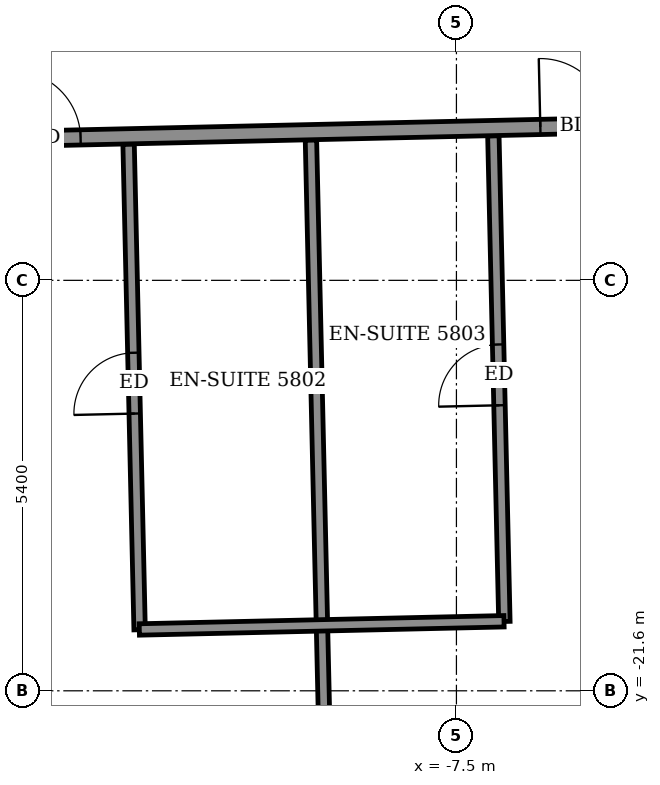
"""IFC4 building model, lengths in metres.
Left out: names, types, materials, properties, quantities, classifications, styles, units other than length and angle.
Written with IfcOpenShell. Run it as: python <this file> out.ifc"""

import sys

from ifc_helpers import new_model, si_unit, direction, frame, frame_2d, origin, place, context, subcontext, project, spatial, rectangle, extrude, element, fill, save


model = new_model("IFC4")
c1 = context("Model", 3, precision=1e-05, world=origin(), true_north=direction((0.0, 1.0)))
c2 = subcontext(c1, "Body", "Model", "MODEL_VIEW")
j1 = project(units=[si_unit("LENGTHUNIT", "METRE"), si_unit("PLANEANGLEUNIT", "RADIAN")], contexts=[c1])
p1 = place(None, origin())
s1 = spatial("IfcSite", under=j1, at=p1, CompositionType="ELEMENT")
p2 = place(p1, origin())
s2 = spatial("IfcBuilding", under=s1, at=p2, CompositionType="ELEMENT")
p3 = place(p2, frame((0.0, 0.0, 231.1)))
s3 = spatial("IfcBuildingStorey", under=s2, at=p3, CompositionType="ELEMENT", Elevation=231.1)
p4 = place(p3, frame((-9.156, -25.728, 0.0), z_axis=(0.0, 0.0, 1.0), x_axis=(-0.022684355347, 0.999742676904, 0.0)))
e1 = element("IfcWall", 1, at=p4, inside=s3, PredefinedType="PARTITIONING", context=c2, shape_type="SweptSolid", body=[
    extrude(rectangle(XDim=11.376, YDim=0.15, at=frame_2d((5.688, 0.0))), origin(), (0.0, 0.0, 1.0), 3.05),
])
p5 = place(p3, frame((-11.668, -20.797, 0.0), z_axis=(0.0, 0.0, 1.0), x_axis=(-0.022695368097, 0.999742426962, 0.0)))
e2 = element("IfcWall", 2, at=p5, inside=s3, PredefinedType="PARTITIONING", context=c2, shape_type="SweptSolid", body=[
    extrude(rectangle(XDim=6.39, YDim=0.15, at=frame_2d((3.195, 0.0))), origin(), (0.0, 0.0, 1.0), 3.05),
])
p6 = place(p5, frame((2.845, 0.0, 0.0)))
e3 = element("IfcOpeningElement", 3, at=p6, cuts=e2, PredefinedType="OPENING", context=c2, shape_type="SweptSolid", body=[
    extrude(rectangle(XDim=0.8, YDim=2.1, at=frame_2d((0.4, 1.05))), frame((0.0, 0.085, 0.0), z_axis=(0.0, -1.0, 0.0), x_axis=(1.0, 0.0, 0.0)), (0.0, 0.0, 1.0), 0.17),
])
p7 = place(p3, frame((-6.869, -20.688, 0.0), z_axis=(0.0, 0.0, 1.0), x_axis=(-0.022696235044, 0.99974240728, 0.0)))
e4 = element("IfcWall", 4, at=p7, inside=s3, PredefinedType="PARTITIONING", context=c2, shape_type="SweptSolid", body=[
    extrude(rectangle(XDim=6.39, YDim=0.15, at=frame_2d((3.195, 0.0))), origin(), (0.0, 0.0, 1.0), 3.05),
])
p8 = place(p7, frame((2.845, 0.0, 0.0)))
e5 = element("IfcOpeningElement", 5, at=p8, cuts=e4, PredefinedType="OPENING", context=c2, shape_type="SweptSolid", body=[
    extrude(rectangle(XDim=0.8, YDim=2.1, at=frame_2d((0.4, 1.05))), frame((0.0, 0.085, 0.0), z_axis=(0.0, -1.0, 0.0), x_axis=(1.0, 0.0, 0.0)), (0.0, 0.0, 1.0), 0.17),
])
p9 = place(p3, frame((-11.672, -20.793, 0.0), z_axis=(0.0, 0.0, 1.0), x_axis=(0.999747191239, 0.022484519337, 0.0)))
e6 = element("IfcWall", 6, at=p9, inside=s3, PredefinedType="PARTITIONING", context=c2, shape_type="SweptSolid", body=[
    extrude(rectangle(XDim=4.799, YDim=0.15, at=frame_2d((2.4, 0.0))), origin(), (0.0, 0.0, 1.0), 3.05),
])
p10 = place(p3, frame((-27.016, -14.65, 0.0), z_axis=(0.0, 0.0, 1.0), x_axis=(0.999742623033, 0.022686729391, 0.0)))
e7 = element("IfcWall", 7, at=p10, inside=s3, PredefinedType="PARTITIONING", context=c2, shape_type="SweptSolid", body=[
    extrude(rectangle(XDim=50.858, YDim=0.2, at=frame_2d((25.429, 0.0))), origin(), (0.0, 0.0, 1.0), 3.05),
])
p11 = place(p10, frame((1.625, 0.0, 0.0)))
e8 = element("IfcOpeningElement", 8, at=p11, cuts=e7, PredefinedType="OPENING", context=c2, shape_type="SweptSolid", body=[
    extrude(rectangle(XDim=1.0, YDim=2.1, at=frame_2d((0.5, 1.05))), frame((0.0, 0.11, 0.0), z_axis=(0.0, -1.0, 0.0), x_axis=(1.0, 0.0, 0.0)), (0.0, 0.0, 1.0), 0.22),
])
p12 = place(p10, frame((6.6, 0.0, 0.0)))
e9 = element("IfcOpeningElement", 9, at=p12, cuts=e7, PredefinedType="OPENING", context=c2, shape_type="SweptSolid", body=[
    extrude(rectangle(XDim=0.9, YDim=2.1, at=frame_2d((0.45, 1.05))), frame((0.0, 0.11, 0.0), z_axis=(0.0, -1.0, 0.0), x_axis=(1.0, 0.0, 0.0)), (0.0, 0.0, 1.0), 0.22),
])
p13 = place(p10, frame((11.5, 0.0, 0.0)))
e10 = element("IfcOpeningElement", 10, at=p13, cuts=e7, PredefinedType="OPENING", context=c2, shape_type="SweptSolid", body=[
    extrude(rectangle(XDim=0.9, YDim=2.1, at=frame_2d((0.45, 1.05))), frame((0.0, 0.11, 0.0), z_axis=(0.0, -1.0, 0.0), x_axis=(1.0, 0.0, 0.0)), (0.0, 0.0, 1.0), 0.22),
])
p14 = place(p10, frame((13.675, 0.0, 0.0)))
e11 = element("IfcOpeningElement", 11, at=p14, cuts=e7, PredefinedType="OPENING", context=c2, shape_type="SweptSolid", body=[
    extrude(rectangle(XDim=0.9, YDim=2.1, at=frame_2d((0.45, 1.05))), frame((0.0, 0.11, 0.0), z_axis=(0.0, -1.0, 0.0), x_axis=(1.0, 0.0, 0.0)), (0.0, 0.0, 1.0), 0.22),
])
p15 = place(p10, frame((20.625, 0.0, 0.0)))
e12 = element("IfcOpeningElement", 12, at=p15, cuts=e7, PredefinedType="OPENING", context=c2, shape_type="SweptSolid", body=[
    extrude(rectangle(XDim=0.9, YDim=2.1, at=frame_2d((0.45, 1.05))), frame((0.0, 0.11, 0.0), z_axis=(0.0, -1.0, 0.0), x_axis=(1.0, 0.0, 0.0)), (0.0, 0.0, 1.0), 0.22),
])
p16 = place(p10, frame((22.775, 0.0, 0.0)))
e13 = element("IfcOpeningElement", 13, at=p16, cuts=e7, PredefinedType="OPENING", context=c2, shape_type="SweptSolid", body=[
    extrude(rectangle(XDim=0.9, YDim=2.1, at=frame_2d((0.45, 1.05))), frame((0.0, 0.11, 0.0), z_axis=(0.0, -1.0, 0.0), x_axis=(1.0, 0.0, 0.0)), (0.0, 0.0, 1.0), 0.22),
])
p17 = place(p10, frame((29.65, 0.0, 0.0)))
e14 = element("IfcOpeningElement", 14, at=p17, cuts=e7, PredefinedType="OPENING", context=c2, shape_type="SweptSolid", body=[
    extrude(rectangle(XDim=0.9, YDim=2.1, at=frame_2d((0.45, 1.05))), frame((0.0, 0.11, 0.0), z_axis=(0.0, -1.0, 0.0), x_axis=(1.0, 0.0, 0.0)), (0.0, 0.0, 1.0), 0.22),
])
p18 = place(p10, frame((31.625, 0.0, 0.0)))
e15 = element("IfcOpeningElement", 15, at=p18, cuts=e7, PredefinedType="OPENING", context=c2, shape_type="SweptSolid", body=[
    extrude(rectangle(XDim=0.9, YDim=2.1, at=frame_2d((0.45, 1.05))), frame((0.0, 0.11, 0.0), z_axis=(0.0, -1.0, 0.0), x_axis=(1.0, 0.0, 0.0)), (0.0, 0.0, 1.0), 0.22),
])
p19 = place(p10, frame((38.5, 0.0, 0.0)))
e16 = element("IfcOpeningElement", 16, at=p19, cuts=e7, PredefinedType="OPENING", context=c2, shape_type="SweptSolid", body=[
    extrude(rectangle(XDim=0.9, YDim=2.1, at=frame_2d((0.45, 1.05))), frame((0.0, 0.11, 0.0), z_axis=(0.0, -1.0, 0.0), x_axis=(1.0, 0.0, 0.0)), (0.0, 0.0, 1.0), 0.22),
])
p20 = place(p10, frame((40.55, 0.0, 0.0)))
e17 = element("IfcOpeningElement", 17, at=p20, cuts=e7, PredefinedType="OPENING", context=c2, shape_type="SweptSolid", body=[
    extrude(rectangle(XDim=0.9, YDim=2.1, at=frame_2d((0.45, 1.05))), frame((0.0, 0.11, 0.0), z_axis=(0.0, -1.0, 0.0), x_axis=(1.0, 0.0, 0.0)), (0.0, 0.0, 1.0), 0.22),
])
p21 = place(p10, frame((47.601, 0.0, 0.0)))
e18 = element("IfcOpeningElement", 18, at=p21, cuts=e7, PredefinedType="OPENING", context=c2, shape_type="SweptSolid", body=[
    extrude(rectangle(XDim=1.0, YDim=2.1, at=frame_2d((0.5, 1.05))), frame((0.0, 0.11, 0.0), z_axis=(0.0, -1.0, 0.0), x_axis=(1.0, 0.0, 0.0)), (0.0, 0.0, 1.0), 0.22),
])
p22 = place(p14, origin())
e19 = element("IfcDoor", 19, at=p22, inside=s3, OperationType="SINGLE_SWING_RIGHT", PredefinedType="DOOR", context=c2, shape_type="SweptSolid", body=[
    extrude(rectangle(XDim=0.9, YDim=2.1, at=frame_2d((0.45, 1.05))), frame((0.0, 0.025, 0.0), z_axis=(0.0, -1.0, 0.0), x_axis=(1.0, 0.0, 0.0)), (0.0, 0.0, 1.0), 0.05),
])
fill(e11, e19)
p23 = place(p6, origin())
e20 = element("IfcDoor", 20, at=p23, inside=s3, OperationType="SINGLE_SWING_RIGHT", PredefinedType="DOOR", context=c2, shape_type="SweptSolid", body=[
    extrude(rectangle(XDim=0.8, YDim=2.1, at=frame_2d((0.4, 1.05))), frame((0.0, 0.025, 0.0), z_axis=(0.0, -1.0, 0.0), x_axis=(1.0, 0.0, 0.0)), (0.0, 0.0, 1.0), 0.05),
])
fill(e3, e20)
p24 = place(p15, origin())
e21 = element("IfcDoor", 21, at=p24, inside=s3, OperationType="SINGLE_SWING_LEFT", PredefinedType="DOOR", context=c2, shape_type="SweptSolid", body=[
    extrude(rectangle(XDim=0.9, YDim=2.1, at=frame_2d((0.45, 1.05))), frame((0.0, 0.025, 0.0), z_axis=(0.0, -1.0, 0.0), x_axis=(1.0, 0.0, 0.0)), (0.0, 0.0, 1.0), 0.05),
])
fill(e12, e21)
p25 = place(p8, origin())
e22 = element("IfcDoor", 22, at=p25, inside=s3, OperationType="SINGLE_SWING_LEFT", PredefinedType="DOOR", context=c2, shape_type="SweptSolid", body=[
    extrude(rectangle(XDim=0.8, YDim=2.1, at=frame_2d((0.4, 1.05))), frame((0.0, 0.025, 0.0), z_axis=(0.0, -1.0, 0.0), x_axis=(1.0, 0.0, 0.0)), (0.0, 0.0, 1.0), 0.05),
])
fill(e5, e22)
save(model, sys.argv[1])
